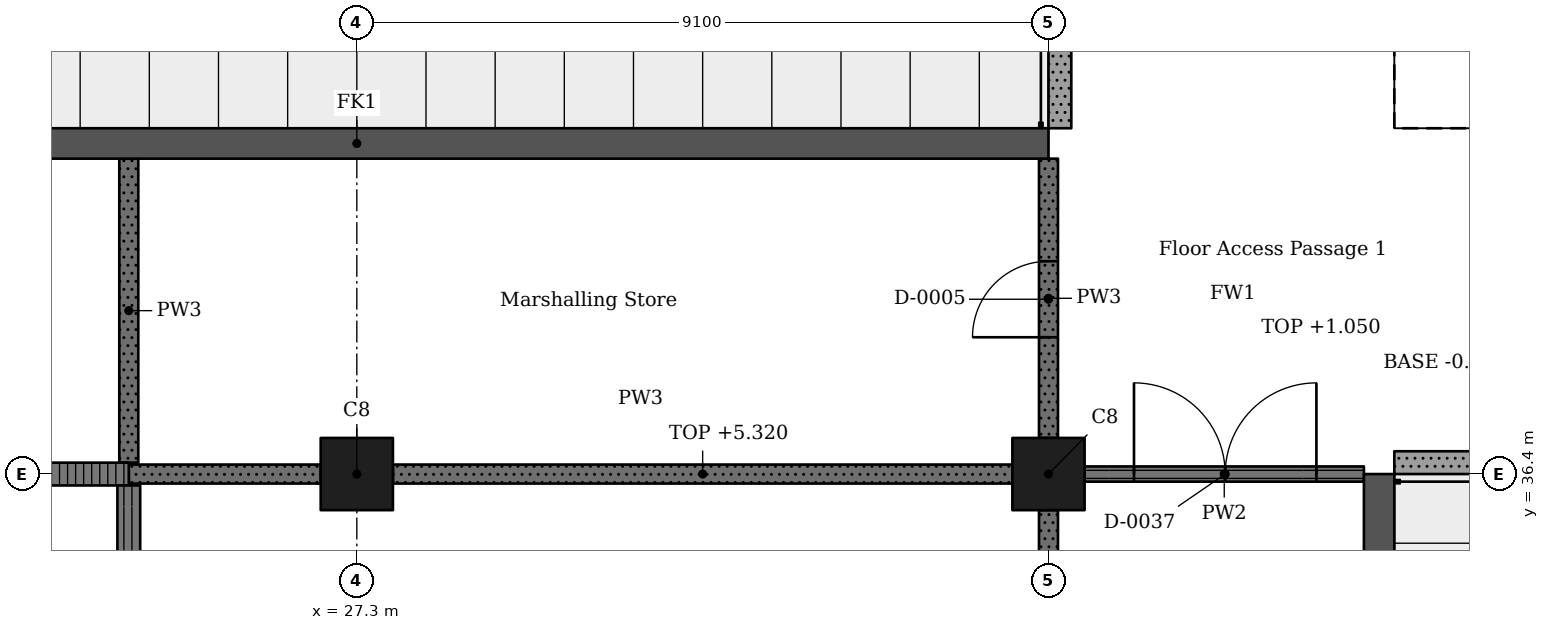
"""IFC4 building model, lengths in metres.
Left out: names, types, materials, properties, quantities, classifications, styles, units other than length and angle.
Written with IfcOpenShell. Run it as: python <this file> out.ifc"""

import sys

from ifc_helpers import new_model, si_unit, direction, frame, frame_2d, origin, origin_2d, place, context, subcontext, project, spatial, rectangle, extrude, element, fill, save


model = new_model("IFC4")
c1 = context("Model", 3, precision=1e-05, world=origin(), true_north=direction((0.0, 1.0)))
c2 = subcontext(c1, "Body", "Model", "MODEL_VIEW")
j1 = project(units=[si_unit("LENGTHUNIT", "METRE"), si_unit("PLANEANGLEUNIT", "RADIAN")], contexts=[c1])
p1 = place(None, origin())
s1 = spatial("IfcSite", under=j1, at=p1, CompositionType="ELEMENT")
p2 = place(p1, origin())
s2 = spatial("IfcBuilding", under=s1, at=p2, CompositionType="ELEMENT")
p3 = place(p2, origin())
s3 = spatial("IfcBuildingStorey", under=s2, at=p3, CompositionType="ELEMENT", Elevation=0.0)
for number, where, z_axis, x_axis in (
    (1, (27.3, 36.4, -0.4), (0.0, 0.0, 1.0), (1.0, 0.0, 0.0)),
    (2, (36.4, 36.4, -0.4), (0.0, 0.0, 1.0), (1.0, 0.0, 0.0)),
):
    element("IfcColumn", number, at=place(p3, frame(where, z_axis=z_axis, x_axis=x_axis)), inside=s3, PredefinedType="COLUMN", context=c2, shape_type="SweptSolid", body=[
        extrude(rectangle(XDim=0.95, YDim=0.95, at=origin_2d()), origin(), (0.0, 0.0, 1.0), 6.77),
    ])
p4 = place(p3, frame((40.95, 36.55, -0.4), z_axis=(0.0, 0.0, 1.0), x_axis=(1.0, 0.0, 0.0)))
e3 = element("IfcWall", 3, at=p4, inside=s3, PredefinedType="SOLIDWALL", context=c2, shape_type="SweptSolid", body=[
    extrude(rectangle(XDim=63.7, YDim=0.3, at=frame_2d((31.85, 0.0))), origin(), (0.0, 0.0, 1.0), 1.45),
])
p5 = place(p3, frame((36.55, 40.95, -0.4), z_axis=(0.0, 0.0, 1.0), x_axis=(0.0, 1.0, 0.0)))
e4 = element("IfcWall", 4, at=p5, inside=s3, PredefinedType="SOLIDWALL", context=c2, shape_type="SweptSolid", body=[
    extrude(rectangle(XDim=27.3, YDim=0.3, at=frame_2d((13.65, 0.0))), origin(), (0.0, 0.0, 1.0), 1.45),
])
p6 = place(p3, frame((40.75, 36.4, -0.4), z_axis=(0.0, 0.0, 1.0), x_axis=(0.0, -1.0, 0.0)))
e5 = element("IfcWall", 5, at=p6, inside=s3, PredefinedType="SHEAR", context=c2, shape_type="SweptSolid", body=[
    extrude(rectangle(XDim=6.409, YDim=0.4, at=frame_2d((3.205, 0.0))), origin(), (0.0, 0.0, 1.0), 6.77),
])
p7 = place(p3, frame((36.4, 40.75, -0.4), z_axis=(0.0, 0.0, 1.0), x_axis=(-1.0, 0.0, 0.0)))
e6 = element("IfcWall", 6, at=p7, inside=s3, PredefinedType="SHEAR", context=c2, shape_type="SweptSolid", body=[
    extrude(rectangle(XDim=18.2, YDim=0.4, at=frame_2d((9.1, 0.0))), origin(), (0.0, 0.0, 1.0), 6.77),
])
p8 = place(p3, frame((18.675, 36.4, 0.0), z_axis=(0.0, 0.0, 1.0), x_axis=(1.0, 0.0, 0.0)))
e7 = element("IfcWall", 7, at=p8, inside=s3, PredefinedType="SOLIDWALL", context=c2, shape_type="SweptSolid", body=[
    extrude(rectangle(XDim=5.625, YDim=0.3, at=frame_2d((2.812, 0.0))), origin(), (0.0, 0.0, 1.0), 5.32),
])
p9 = place(p8, frame((2.35, 0.0, 0.0)))
e8 = element("IfcOpeningElement", 8, at=p9, cuts=e7, PredefinedType="OPENING", context=c2, shape_type="SweptSolid", body=[
    extrude(rectangle(XDim=1.0, YDim=2.1, at=frame_2d((0.5, 1.05))), frame((0.0, 0.16, 0.0), z_axis=(0.0, -1.0, 0.0), x_axis=(1.0, 0.0, 0.0)), (0.0, 0.0, 1.0), 0.32),
])
p10 = place(p3, frame((24.3, 36.25, 0.0), z_axis=(0.0, 0.0, 1.0), x_axis=(0.0, -1.0, 0.0)))
e9 = element("IfcWall", 9, at=p10, inside=s3, PredefinedType="SOLIDWALL", context=c2, shape_type="SweptSolid", body=[
    extrude(rectangle(XDim=6.32, YDim=0.3, at=frame_2d((3.16, 0.0))), origin(), (0.0, 0.0, 1.0), 6.02),
])
p11 = place(p3, frame((24.3, 36.4, 0.0), z_axis=(0.0, 0.0, 1.0), x_axis=(1.0, 0.0, 0.0)))
e10 = element("IfcWall", 10, at=p11, inside=s3, PredefinedType="SOLIDWALL", context=c2, shape_type="SweptSolid", body=[
    extrude(rectangle(XDim=2.525, YDim=0.25, at=frame_2d((1.262, 0.0))), origin(), (0.0, 0.0, 1.0), 5.32),
])
p12 = place(p3, frame((24.3, 40.55, 0.0), z_axis=(0.0, 0.0, 1.0), x_axis=(0.0, -1.0, 0.0)))
e11 = element("IfcWall", 11, at=p12, inside=s3, PredefinedType="SOLIDWALL", context=c2, shape_type="SweptSolid", body=[
    extrude(rectangle(XDim=4.0, YDim=0.25, at=frame_2d((2.0, 0.0))), origin(), (0.0, 0.0, 1.0), 6.02),
])
p13 = place(p3, frame((27.775, 36.4, 0.0), z_axis=(0.0, 0.0, 1.0), x_axis=(1.0, 0.0, 0.0)))
e12 = element("IfcWall", 12, at=p13, inside=s3, PredefinedType="SOLIDWALL", context=c2, shape_type="SweptSolid", body=[
    extrude(rectangle(XDim=8.15, YDim=0.25, at=frame_2d((4.075, 0.0))), origin(), (0.0, 0.0, 1.0), 5.32),
])
p14 = place(p3, frame((36.4, 35.925, 0.0), z_axis=(0.0, 0.0, 1.0), x_axis=(0.0, -1.0, 0.0)))
e13 = element("IfcWall", 13, at=p14, inside=s3, PredefinedType="SOLIDWALL", context=c2, shape_type="SweptSolid", body=[
    extrude(rectangle(XDim=8.175, YDim=0.25, at=frame_2d((4.087, 0.0))), origin(), (0.0, 0.0, 1.0), 5.32),
])
p15 = place(p3, frame((36.4, 40.55, 0.0), z_axis=(0.0, 0.0, 1.0), x_axis=(0.0, -1.0, 0.0)))
e14 = element("IfcWall", 14, at=p15, inside=s3, PredefinedType="SOLIDWALL", context=c2, shape_type="SweptSolid", body=[
    extrude(rectangle(XDim=3.675, YDim=0.25, at=frame_2d((1.837, 0.0))), origin(), (0.0, 0.0, 1.0), 6.02),
])
p16 = place(p15, frame((1.35, 0.0, 0.0)))
e15 = element("IfcOpeningElement", 15, at=p16, cuts=e14, PredefinedType="OPENING", context=c2, shape_type="SweptSolid", body=[
    extrude(rectangle(XDim=1.0, YDim=2.1, at=frame_2d((0.5, 1.05))), frame((0.0, 0.135, 0.0), z_axis=(0.0, -1.0, 0.0), x_axis=(1.0, 0.0, 0.0)), (0.0, 0.0, 1.0), 0.27),
])
p17 = place(p3, frame((36.875, 36.4, 0.0), z_axis=(0.0, 0.0, 1.0), x_axis=(1.0, 0.0, 0.0)))
e16 = element("IfcWall", 16, at=p17, inside=s3, PredefinedType="PARTITIONING", context=c2, shape_type="SweptSolid", body=[
    extrude(rectangle(XDim=3.675, YDim=0.2, at=frame_2d((1.837, 0.0))), origin(), (0.0, 0.0, 1.0), 6.02),
])
p18 = place(p17, frame((0.65, 0.0, 0.0)))
e17 = element("IfcOpeningElement", 17, at=p18, cuts=e16, PredefinedType="OPENING", context=c2, shape_type="SweptSolid", body=[
    extrude(rectangle(XDim=2.4, YDim=2.4, at=frame_2d((1.2, 1.2))), frame((0.0, 0.11, 0.0), z_axis=(0.0, -1.0, 0.0), x_axis=(1.0, 0.0, 0.0)), (0.0, 0.0, 1.0), 0.22),
])
p19 = place(p16, origin())
e18 = element("IfcDoor", 18, at=p19, inside=s3, OperationType="SINGLE_SWING_RIGHT", PredefinedType="DOOR", context=c2, shape_type="SweptSolid", body=[
    extrude(rectangle(XDim=1.0, YDim=2.1, at=frame_2d((0.5, 1.05))), frame((0.0, 0.025, 0.0), z_axis=(0.0, -1.0, 0.0), x_axis=(1.0, 0.0, 0.0)), (0.0, 0.0, 1.0), 0.05),
])
fill(e15, e18)
p20 = place(p18, origin())
e19 = element("IfcDoor", 19, at=p20, inside=s3, OperationType="DOUBLE_DOOR_SINGLE_SWING", PredefinedType="DOOR", context=c2, shape_type="SweptSolid", body=[
    extrude(rectangle(XDim=2.4, YDim=2.4, at=frame_2d((1.2, 1.2))), frame((0.0, 0.025, 0.0), z_axis=(0.0, -1.0, 0.0), x_axis=(1.0, 0.0, 0.0)), (0.0, 0.0, 1.0), 0.05),
])
fill(e17, e19)
save(model, sys.argv[1])
